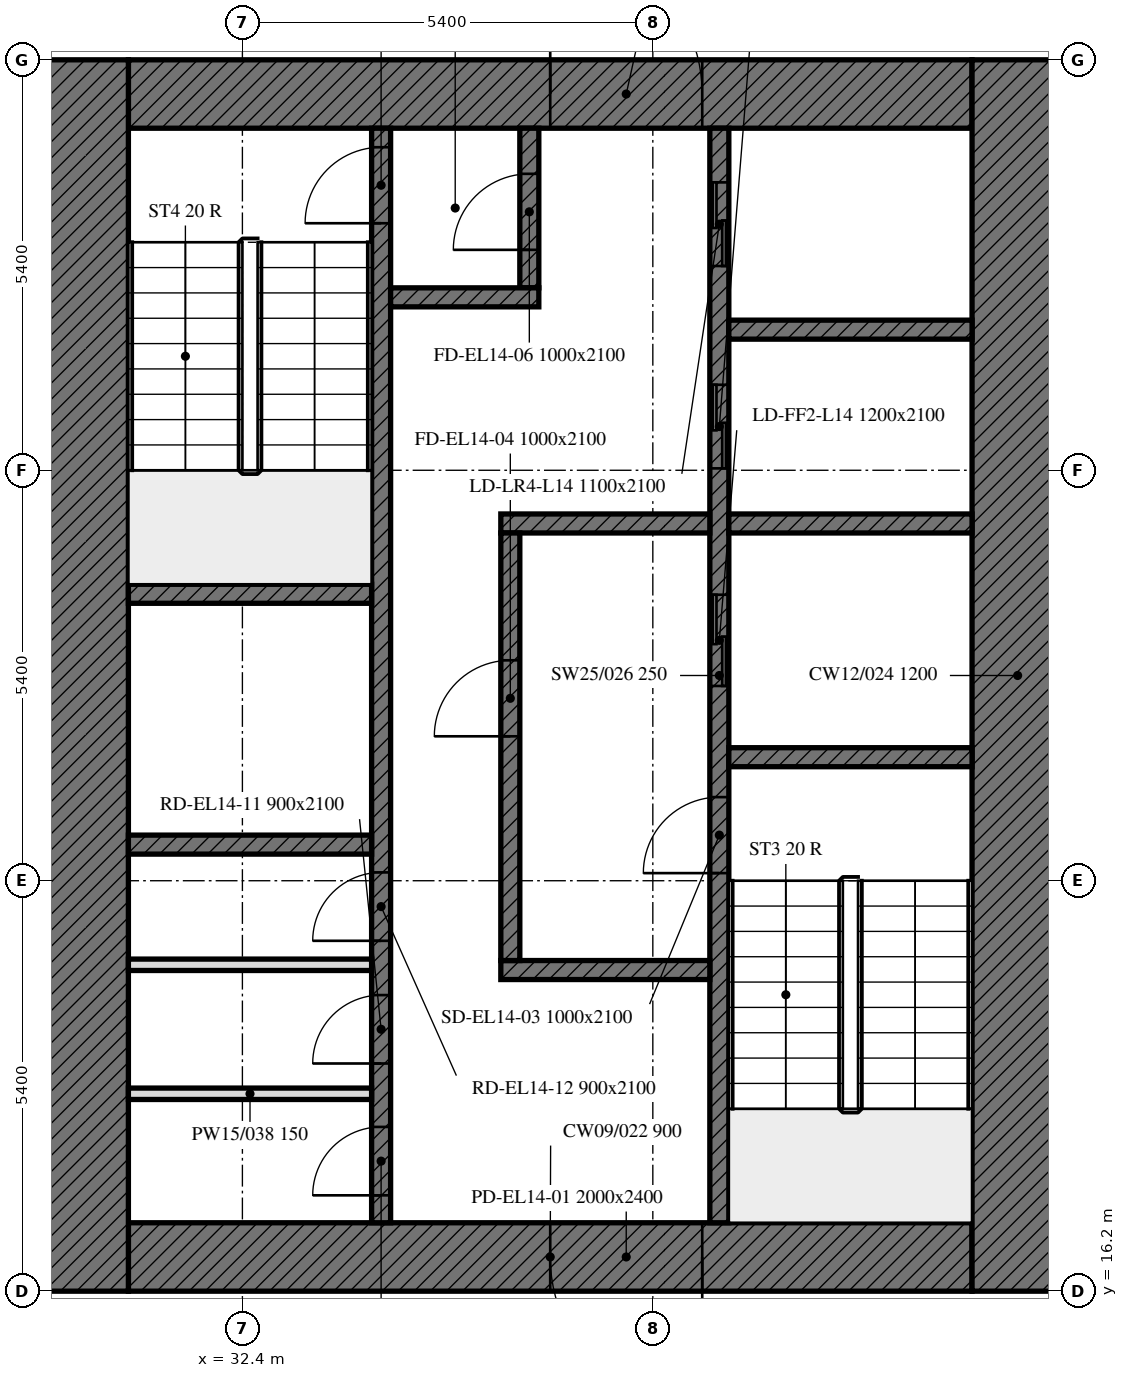
"""IFC4 building model, lengths in metres.
Left out: names, types, materials, properties, quantities, classifications, styles, units other than length and angle.
Written with IfcOpenShell. Run it as: python <this file> out.ifc"""

import sys

from ifc_helpers import new_model, si_unit, direction, frame, frame_2d, origin, place, context, subcontext, project, spatial, rectangle, extrude, element, fill, save


model = new_model("IFC4")
c1 = context("Model", 3, precision=1e-05, world=origin(), true_north=direction((0.0, 1.0)))
c2 = subcontext(c1, "Body", "Model", "MODEL_VIEW")
j1 = project(units=[si_unit("LENGTHUNIT", "METRE"), si_unit("PLANEANGLEUNIT", "RADIAN")], contexts=[c1])
p1 = place(None, origin())
s1 = spatial("IfcSite", under=j1, at=p1, CompositionType="ELEMENT")
p2 = place(p1, origin())
s2 = spatial("IfcBuilding", under=s1, at=p2, CompositionType="ELEMENT")
p3 = place(p2, frame((0.0, 0.0, 65.0)))
s3 = spatial("IfcBuildingStorey", under=s2, at=p3, CompositionType="ELEMENT", Elevation=65.0)
p4 = place(p3, frame((42.0, 16.65, 0.0), z_axis=(0.0, 0.0, 1.0), x_axis=(-1.0, 0.0, 0.0)))
e1 = element("IfcWall", 1, at=p4, inside=s3, PredefinedType="SOLIDWALL", context=c2, shape_type="SweptSolid", body=[
    extrude(rectangle(XDim=11.1, YDim=0.9, at=frame_2d((5.55, 0.0))), origin(), (0.0, 0.0, 1.0), 3.5),
])
p5 = place(p4, frame((3.55, 0.0, 0.0)))
e2 = element("IfcOpeningElement", 2, at=p5, cuts=e1, PredefinedType="OPENING", context=c2, shape_type="SweptSolid", body=[
    extrude(rectangle(XDim=2.0, YDim=2.4, at=frame_2d((1.0, 1.2))), frame((0.0, 0.45, 0.0), z_axis=(0.0, -1.0, 0.0), x_axis=(1.0, 0.0, 0.0)), (0.0, 0.0, 1.0), 0.9),
])
p6 = place(p3, frame((30.9, 31.95, 0.0), z_axis=(0.0, 0.0, 1.0), x_axis=(1.0, 0.0, 0.0)))
e3 = element("IfcWall", 3, at=p6, inside=s3, PredefinedType="SOLIDWALL", context=c2, shape_type="SweptSolid", body=[
    extrude(rectangle(XDim=11.1, YDim=0.9, at=frame_2d((5.55, 0.0))), origin(), (0.0, 0.0, 1.0), 3.5),
])
p7 = place(p6, frame((5.55, 0.0, 0.0)))
e4 = element("IfcOpeningElement", 4, at=p7, cuts=e3, PredefinedType="OPENING", context=c2, shape_type="SweptSolid", body=[
    extrude(rectangle(XDim=2.0, YDim=2.4, at=frame_2d((1.0, 1.2))), frame((0.0, 0.45, 0.0), z_axis=(0.0, -1.0, 0.0), x_axis=(1.0, 0.0, 0.0)), (0.0, 0.0, 1.0), 0.9),
])
for number, where, z_axis, x_axis in (
    (5, (42.6, 32.4, 0.0), (0.0, 0.0, 1.0), (0.0, -1.0, 0.0)),
    (6, (30.3, 16.2, 0.0), (0.0, 0.0, 1.0), (0.0, 1.0, 0.0)),
):
    element("IfcWall", number, at=place(p3, frame(where, z_axis=z_axis, x_axis=x_axis)), inside=s3, PredefinedType="SOLIDWALL", context=c2, shape_type="SweptSolid", body=[
        extrude(rectangle(XDim=16.2, YDim=1.2, at=frame_2d((8.1, 0.0))), origin(), (0.0, 0.0, 1.0), 3.5),
    ])
p8 = place(p3, frame((38.675, 17.1, 0.0), z_axis=(0.0, 0.0, 1.0), x_axis=(0.0, 1.0, 0.0)))
e7 = element("IfcWall", 7, at=p8, inside=s3, PredefinedType="SOLIDWALL", context=c2, shape_type="SweptSolid", body=[
    extrude(rectangle(XDim=14.4, YDim=0.25, at=frame_2d((7.2, 0.0))), origin(), (0.0, 0.0, 1.0), 3.5),
])
p9 = place(p8, frame((4.6, 0.0, 0.0)))
e8 = element("IfcOpeningElement", 8, at=p9, cuts=e7, PredefinedType="OPENING", context=c2, shape_type="SweptSolid", body=[
    extrude(rectangle(XDim=1.0, YDim=2.1, at=frame_2d((0.5, 1.05))), frame((0.0, 0.125, 0.0), z_axis=(0.0, -1.0, 0.0), x_axis=(1.0, 0.0, 0.0)), (0.0, 0.0, 1.0), 0.25),
])
p10 = place(p8, frame((7.062, 0.0, 0.0)))
e9 = element("IfcOpeningElement", 9, at=p10, cuts=e7, PredefinedType="OPENING", context=c2, shape_type="SweptSolid", body=[
    extrude(rectangle(XDim=1.2, YDim=2.1, at=frame_2d((0.6, 1.05))), frame((0.0, 0.125, 0.0), z_axis=(0.0, -1.0, 0.0), x_axis=(1.0, 0.0, 0.0)), (0.0, 0.0, 1.0), 0.25),
])
p11 = place(p8, frame((9.925, 0.0, 0.0)))
e10 = element("IfcOpeningElement", 10, at=p11, cuts=e7, PredefinedType="OPENING", context=c2, shape_type="SweptSolid", body=[
    extrude(rectangle(XDim=1.1, YDim=2.1, at=frame_2d((0.55, 1.05))), frame((0.0, 0.125, 0.0), z_axis=(0.0, -1.0, 0.0), x_axis=(1.0, 0.0, 0.0)), (0.0, 0.0, 1.0), 0.25),
])
p12 = place(p8, frame((12.587, 0.0, 0.0)))
e11 = element("IfcOpeningElement", 11, at=p12, cuts=e7, PredefinedType="OPENING", context=c2, shape_type="SweptSolid", body=[
    extrude(rectangle(XDim=1.1, YDim=2.1, at=frame_2d((0.55, 1.05))), frame((0.0, 0.125, 0.0), z_axis=(0.0, -1.0, 0.0), x_axis=(1.0, 0.0, 0.0)), (0.0, 0.0, 1.0), 0.25),
])
p13 = place(p3, frame((34.225, 17.1, 0.0), z_axis=(0.0, 0.0, 1.0), x_axis=(0.0, 1.0, 0.0)))
e12 = element("IfcWall", 12, at=p13, inside=s3, PredefinedType="SOLIDWALL", context=c2, shape_type="SweptSolid", body=[
    extrude(rectangle(XDim=14.4, YDim=0.25, at=frame_2d((7.2, 0.0))), origin(), (0.0, 0.0, 1.0), 3.5),
])
p14 = place(p13, frame((13.15, 0.0, 0.0)))
e13 = element("IfcOpeningElement", 13, at=p14, cuts=e12, PredefinedType="OPENING", context=c2, shape_type="SweptSolid", body=[
    extrude(rectangle(XDim=1.0, YDim=2.1, at=frame_2d((0.5, 1.05))), frame((0.0, 0.125, 0.0), z_axis=(0.0, -1.0, 0.0), x_axis=(1.0, 0.0, 0.0)), (0.0, 0.0, 1.0), 0.25),
])
p15 = place(p13, frame((0.361, 0.0, 0.0)))
e14 = element("IfcOpeningElement", 14, at=p15, cuts=e12, PredefinedType="OPENING", context=c2, shape_type="SweptSolid", body=[
    extrude(rectangle(XDim=0.9, YDim=2.1, at=frame_2d((0.45, 1.05))), frame((0.0, 0.125, 0.0), z_axis=(0.0, -1.0, 0.0), x_axis=(1.0, 0.0, 0.0)), (0.0, 0.0, 1.0), 0.25),
])
p16 = place(p13, frame((2.095, 0.0, 0.0)))
e15 = element("IfcOpeningElement", 15, at=p16, cuts=e12, PredefinedType="OPENING", context=c2, shape_type="SweptSolid", body=[
    extrude(rectangle(XDim=0.9, YDim=2.1, at=frame_2d((0.45, 1.05))), frame((0.0, 0.125, 0.0), z_axis=(0.0, -1.0, 0.0), x_axis=(1.0, 0.0, 0.0)), (0.0, 0.0, 1.0), 0.25),
])
p17 = place(p13, frame((3.709, 0.0, 0.0)))
e16 = element("IfcOpeningElement", 16, at=p17, cuts=e12, PredefinedType="OPENING", context=c2, shape_type="SweptSolid", body=[
    extrude(rectangle(XDim=0.9, YDim=2.1, at=frame_2d((0.45, 1.05))), frame((0.0, 0.125, 0.0), z_axis=(0.0, -1.0, 0.0), x_axis=(1.0, 0.0, 0.0)), (0.0, 0.0, 1.0), 0.25),
])
p18 = place(p3, frame((38.8, 23.225, 0.0), z_axis=(0.0, 0.0, 1.0), x_axis=(1.0, 0.0, 0.0)))
e17 = element("IfcWall", 17, at=p18, inside=s3, PredefinedType="SOLIDWALL", context=c2, shape_type="SweptSolid", body=[
    extrude(rectangle(XDim=3.2, YDim=0.25, at=frame_2d((1.6, 0.0))), origin(), (0.0, 0.0, 1.0), 3.5),
])
for number, where, z_axis, x_axis in (
    (18, (30.9, 25.375, 0.0), (0.0, 0.0, 1.0), (1.0, 0.0, 0.0)),
    (19, (30.9, 22.075, 0.0), (0.0, 0.0, 1.0), (1.0, 0.0, 0.0)),
):
    element("IfcWall", number, at=place(p3, frame(where, z_axis=z_axis, x_axis=x_axis)), inside=s3, PredefinedType="SOLIDWALL", context=c2, shape_type="SweptSolid", body=[
        extrude(rectangle(XDim=3.2, YDim=0.25, at=frame_2d((1.6, 0.0))), origin(), (0.0, 0.0, 1.0), 3.5),
    ])
p19 = place(p3, frame((38.8, 26.3, 0.0), z_axis=(0.0, 0.0, 1.0), x_axis=(1.0, 0.0, 0.0)))
e20 = element("IfcWall", 20, at=p19, inside=s3, PredefinedType="SOLIDWALL", context=c2, shape_type="SweptSolid", body=[
    extrude(rectangle(XDim=3.2, YDim=0.25, at=frame_2d((1.6, 0.0))), origin(), (0.0, 0.0, 1.0), 3.5),
])
for number, where, z_axis, x_axis in (
    (21, (35.8, 26.3, 0.0), (0.0, 0.0, 1.0), (1.0, 0.0, 0.0)),
    (22, (35.8, 20.425, 0.0), (0.0, 0.0, 1.0), (1.0, 0.0, 0.0)),
):
    element("IfcWall", number, at=place(p3, frame(where, z_axis=z_axis, x_axis=x_axis)), inside=s3, PredefinedType="SOLIDWALL", context=c2, shape_type="SweptSolid", body=[
        extrude(rectangle(XDim=2.75, YDim=0.25, at=frame_2d((1.375, 0.0))), origin(), (0.0, 0.0, 1.0), 3.5),
    ])
p20 = place(p3, frame((36.175, 29.4, 0.0), z_axis=(0.0, 0.0, 1.0), x_axis=(0.0, 1.0, 0.0)))
e23 = element("IfcWall", 23, at=p20, inside=s3, PredefinedType="SOLIDWALL", context=c2, shape_type="SweptSolid", body=[
    extrude(rectangle(XDim=2.1, YDim=0.25, at=frame_2d((1.05, 0.0))), origin(), (0.0, 0.0, 1.0), 3.5),
])
p21 = place(p20, frame((0.5, 0.0, 0.0)))
e24 = element("IfcOpeningElement", 24, at=p21, cuts=e23, PredefinedType="OPENING", context=c2, shape_type="SweptSolid", body=[
    extrude(rectangle(XDim=1.0, YDim=2.1, at=frame_2d((0.5, 1.05))), frame((0.0, 0.125, 0.0), z_axis=(0.0, -1.0, 0.0), x_axis=(1.0, 0.0, 0.0)), (0.0, 0.0, 1.0), 0.25),
])
p22 = place(p3, frame((34.35, 29.275, 0.0), z_axis=(0.0, 0.0, 1.0), x_axis=(1.0, 0.0, 0.0)))
e25 = element("IfcWall", 25, at=p22, inside=s3, PredefinedType="SOLIDWALL", context=c2, shape_type="SweptSolid", body=[
    extrude(rectangle(XDim=1.95, YDim=0.25, at=frame_2d((0.975, 0.0))), origin(), (0.0, 0.0, 1.0), 3.5),
])
p23 = place(p3, frame((35.925, 20.55, 0.0), z_axis=(0.0, 0.0, 1.0), x_axis=(0.0, 1.0, 0.0)))
e26 = element("IfcWall", 26, at=p23, inside=s3, PredefinedType="SOLIDWALL", context=c2, shape_type="SweptSolid", body=[
    extrude(rectangle(XDim=5.625, YDim=0.25, at=frame_2d((2.812, 0.0))), origin(), (0.0, 0.0, 1.0), 3.5),
])
p24 = place(p23, frame((2.95, 0.0, 0.0)))
e27 = element("IfcOpeningElement", 27, at=p24, cuts=e26, PredefinedType="OPENING", context=c2, shape_type="SweptSolid", body=[
    extrude(rectangle(XDim=1.0, YDim=2.1, at=frame_2d((0.5, 1.05))), frame((0.0, 0.125, 0.0), z_axis=(0.0, -1.0, 0.0), x_axis=(1.0, 0.0, 0.0)), (0.0, 0.0, 1.0), 0.25),
])
p25 = place(p3, frame((38.8, 28.85, 0.0), z_axis=(0.0, 0.0, 1.0), x_axis=(1.0, 0.0, 0.0)))
e28 = element("IfcWall", 28, at=p25, inside=s3, PredefinedType="SOLIDWALL", context=c2, shape_type="SweptSolid", body=[
    extrude(rectangle(XDim=3.2, YDim=0.25, at=frame_2d((1.6, 0.0))), origin(), (0.0, 0.0, 1.0), 3.5),
])
for number, where, z_axis, x_axis in (
    (29, (30.9, 18.797, 0.0), (0.0, 0.0, 1.0), (1.0, 0.0, 0.0)),
    (30, (30.9, 20.494, 0.0), (0.0, 0.0, 1.0), (1.0, 0.0, 0.0)),
):
    element("IfcWall", number, at=place(p3, frame(where, z_axis=z_axis, x_axis=x_axis)), inside=s3, PredefinedType="PARTITIONING", context=c2, shape_type="SweptSolid", body=[
        extrude(rectangle(XDim=3.2, YDim=0.15, at=frame_2d((1.6, 0.0))), origin(), (0.0, 0.0, 1.0), 3.5),
    ])
p26 = place(p5, origin())
e31 = element("IfcDoor", 31, at=p26, inside=s3, OperationType="DOUBLE_DOOR_SINGLE_SWING", PredefinedType="DOOR", context=c2, shape_type="SweptSolid", body=[
    extrude(rectangle(XDim=2.0, YDim=2.4, at=frame_2d((1.0, 1.2))), frame((0.0, 0.025, 0.0), z_axis=(0.0, -1.0, 0.0), x_axis=(1.0, 0.0, 0.0)), (0.0, 0.0, 1.0), 0.05),
])
fill(e2, e31)
p27 = place(p7, origin())
e32 = element("IfcDoor", 32, at=p27, inside=s3, OperationType="DOUBLE_DOOR_SINGLE_SWING", PredefinedType="DOOR", context=c2, shape_type="SweptSolid", body=[
    extrude(rectangle(XDim=2.0, YDim=2.4, at=frame_2d((1.0, 1.2))), frame((0.0, 0.025, 0.0), z_axis=(0.0, -1.0, 0.0), x_axis=(1.0, 0.0, 0.0)), (0.0, 0.0, 1.0), 0.05),
])
fill(e4, e32)
p28 = place(p9, origin())
e33 = element("IfcDoor", 33, at=p28, inside=s3, OperationType="SINGLE_SWING_LEFT", PredefinedType="DOOR", context=c2, shape_type="SweptSolid", body=[
    extrude(rectangle(XDim=1.0, YDim=2.1, at=frame_2d((0.5, 1.05))), frame((0.0, 0.025, 0.0), z_axis=(0.0, -1.0, 0.0), x_axis=(1.0, 0.0, 0.0)), (0.0, 0.0, 1.0), 0.05),
])
fill(e8, e33)
p29 = place(p24, origin())
e34 = element("IfcDoor", 34, at=p29, inside=s3, OperationType="SINGLE_SWING_LEFT", PredefinedType="DOOR", context=c2, shape_type="SweptSolid", body=[
    extrude(rectangle(XDim=1.0, YDim=2.1, at=frame_2d((0.5, 1.05))), frame((0.0, 0.025, 0.0), z_axis=(0.0, -1.0, 0.0), x_axis=(1.0, 0.0, 0.0)), (0.0, 0.0, 1.0), 0.05),
])
fill(e27, e34)
p30 = place(p14, origin())
e35 = element("IfcDoor", 35, at=p30, inside=s3, OperationType="SINGLE_SWING_LEFT", PredefinedType="DOOR", context=c2, shape_type="SweptSolid", body=[
    extrude(rectangle(XDim=1.0, YDim=2.1, at=frame_2d((0.5, 1.05))), frame((0.0, 0.025, 0.0), z_axis=(0.0, -1.0, 0.0), x_axis=(1.0, 0.0, 0.0)), (0.0, 0.0, 1.0), 0.05),
])
fill(e13, e35)
p31 = place(p21, origin())
e36 = element("IfcDoor", 36, at=p31, inside=s3, OperationType="SINGLE_SWING_LEFT", PredefinedType="DOOR", context=c2, shape_type="SweptSolid", body=[
    extrude(rectangle(XDim=1.0, YDim=2.1, at=frame_2d((0.5, 1.05))), frame((0.0, 0.025, 0.0), z_axis=(0.0, -1.0, 0.0), x_axis=(1.0, 0.0, 0.0)), (0.0, 0.0, 1.0), 0.05),
])
fill(e24, e36)
p32 = place(p10, origin())
e37 = element("IfcDoor", 37, at=p32, inside=s3, OperationType="DOUBLE_DOOR_SLIDING", PredefinedType="DOOR", context=c2, shape_type="SweptSolid", body=[
    extrude(rectangle(XDim=1.2, YDim=2.1, at=frame_2d((0.6, 1.05))), frame((0.0, 0.025, 0.0), z_axis=(0.0, -1.0, 0.0), x_axis=(1.0, 0.0, 0.0)), (0.0, 0.0, 1.0), 0.05),
])
fill(e9, e37)
p33 = place(p11, origin())
e38 = element("IfcDoor", 38, at=p33, inside=s3, OperationType="DOUBLE_DOOR_SLIDING", PredefinedType="DOOR", context=c2, shape_type="SweptSolid", body=[
    extrude(rectangle(XDim=1.1, YDim=2.1, at=frame_2d((0.55, 1.05))), frame((0.0, 0.025, 0.0), z_axis=(0.0, -1.0, 0.0), x_axis=(1.0, 0.0, 0.0)), (0.0, 0.0, 1.0), 0.05),
])
fill(e10, e38)
p34 = place(p12, origin())
e39 = element("IfcDoor", 39, at=p34, inside=s3, OperationType="DOUBLE_DOOR_SLIDING", PredefinedType="DOOR", context=c2, shape_type="SweptSolid", body=[
    extrude(rectangle(XDim=1.1, YDim=2.1, at=frame_2d((0.55, 1.05))), frame((0.0, 0.025, 0.0), z_axis=(0.0, -1.0, 0.0), x_axis=(1.0, 0.0, 0.0)), (0.0, 0.0, 1.0), 0.05),
])
fill(e11, e39)
p35 = place(p15, origin())
e40 = element("IfcDoor", 40, at=p35, inside=s3, OperationType="SINGLE_SWING_LEFT", PredefinedType="DOOR", context=c2, shape_type="SweptSolid", body=[
    extrude(rectangle(XDim=0.9, YDim=2.1, at=frame_2d((0.45, 1.05))), frame((0.0, 0.025, 0.0), z_axis=(0.0, -1.0, 0.0), x_axis=(1.0, 0.0, 0.0)), (0.0, 0.0, 1.0), 0.05),
])
fill(e14, e40)
p36 = place(p16, origin())
e41 = element("IfcDoor", 41, at=p36, inside=s3, OperationType="SINGLE_SWING_LEFT", PredefinedType="DOOR", context=c2, shape_type="SweptSolid", body=[
    extrude(rectangle(XDim=0.9, YDim=2.1, at=frame_2d((0.45, 1.05))), frame((0.0, 0.025, 0.0), z_axis=(0.0, -1.0, 0.0), x_axis=(1.0, 0.0, 0.0)), (0.0, 0.0, 1.0), 0.05),
])
fill(e15, e41)
p37 = place(p17, origin())
e42 = element("IfcDoor", 42, at=p37, inside=s3, OperationType="SINGLE_SWING_LEFT", PredefinedType="DOOR", context=c2, shape_type="SweptSolid", body=[
    extrude(rectangle(XDim=0.9, YDim=2.1, at=frame_2d((0.45, 1.05))), frame((0.0, 0.025, 0.0), z_axis=(0.0, -1.0, 0.0), x_axis=(1.0, 0.0, 0.0)), (0.0, 0.0, 1.0), 0.05),
])
fill(e16, e42)
save(model, sys.argv[1])
